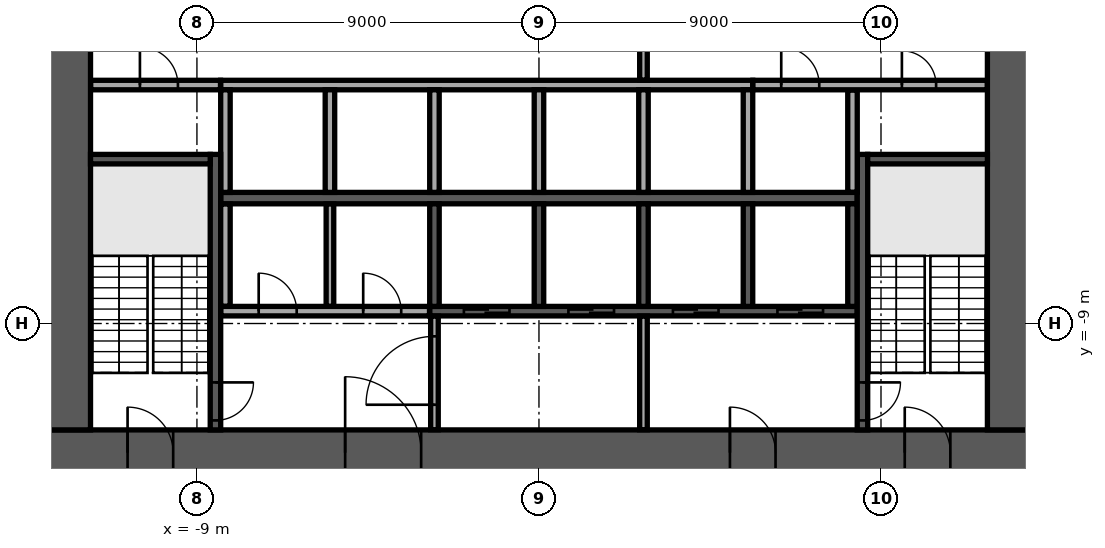
"""IFC4 building model, lengths in metres.
Left out: names, types, materials, properties, quantities, classifications, styles, units other than length and angle.
Written with IfcOpenShell. Run it as: python <this file> out.ifc"""

import sys

from ifc_helpers import new_model, si_unit, direction, frame, frame_2d, origin, place, context, subcontext, project, spatial, rectangle, extrude, element, fill, save


model = new_model("IFC4")
c1 = context("Model", 3, precision=1e-05, world=origin(), true_north=direction((0.0, 1.0)))
c2 = subcontext(c1, "Body", "Model", "MODEL_VIEW")
j1 = project(units=[si_unit("LENGTHUNIT", "METRE"), si_unit("PLANEANGLEUNIT", "RADIAN")], contexts=[c1])
p1 = place(None, origin())
s1 = spatial("IfcSite", under=j1, at=p1, CompositionType="ELEMENT")
p2 = place(p1, origin())
s2 = spatial("IfcBuilding", under=s1, at=p2, CompositionType="ELEMENT")
p3 = place(p2, frame((0.0, 0.0, 4.5)))
s3 = spatial("IfcBuildingStorey", under=s2, at=p3, CompositionType="ELEMENT", Elevation=4.5)
p4 = place(p3, frame((-13.0, -12.4, 0.0), z_axis=(0.0, 0.0, 1.0), x_axis=(1.0, 0.0, 0.0)))
e1 = element("IfcWall", 1, at=p4, inside=s3, PredefinedType="SHEAR", context=c2, shape_type="SweptSolid", body=[
    extrude(rectangle(XDim=26.0, YDim=1.2, at=frame_2d((13.0, 0.0))), origin(), (0.0, 0.0, 1.0), 4.1),
])
p5 = place(p4, frame((7.9, 0.0, 0.0)))
e2 = element("IfcOpeningElement", 2, at=p5, cuts=e1, PredefinedType="OPENING", context=c2, shape_type="SweptSolid", body=[
    extrude(rectangle(XDim=2.0, YDim=2.1, at=frame_2d((1.0, 1.05))), frame((0.0, 0.61, 0.0), z_axis=(0.0, -1.0, 0.0), x_axis=(1.0, 0.0, 0.0)), (0.0, 0.0, 1.0), 1.22),
])
p6 = place(p4, frame((18.025, 0.0, 0.0)))
e3 = element("IfcOpeningElement", 3, at=p6, cuts=e1, PredefinedType="OPENING", context=c2, shape_type="SweptSolid", body=[
    extrude(rectangle(XDim=1.2, YDim=2.1, at=frame_2d((0.6, 1.05))), frame((0.0, 0.61, 0.0), z_axis=(0.0, -1.0, 0.0), x_axis=(1.0, 0.0, 0.0)), (0.0, 0.0, 1.0), 1.22),
])
p7 = place(p4, frame((2.175, 0.0, 0.0)))
e4 = element("IfcOpeningElement", 4, at=p7, cuts=e1, PredefinedType="OPENING", context=c2, shape_type="SweptSolid", body=[
    extrude(rectangle(XDim=1.2, YDim=2.1, at=frame_2d((0.6, 1.05))), frame((0.0, 0.61, 0.0), z_axis=(0.0, -1.0, 0.0), x_axis=(1.0, 0.0, 0.0)), (0.0, 0.0, 1.0), 1.22),
])
p8 = place(p4, frame((22.625, 0.0, 0.0)))
e5 = element("IfcOpeningElement", 5, at=p8, cuts=e1, PredefinedType="OPENING", context=c2, shape_type="SweptSolid", body=[
    extrude(rectangle(XDim=1.2, YDim=2.1, at=frame_2d((0.6, 1.05))), frame((0.0, 0.61, 0.0), z_axis=(0.0, -1.0, 0.0), x_axis=(1.0, 0.0, 0.0)), (0.0, 0.0, 1.0), 1.22),
])
p9 = place(p3, frame((12.4, -11.8, 0.0), z_axis=(0.0, 0.0, 1.0), x_axis=(0.0, 1.0, 0.0)))
e6 = element("IfcWall", 6, at=p9, inside=s3, PredefinedType="SHEAR", context=c2, shape_type="SweptSolid", body=[
    extrude(rectangle(XDim=23.6, YDim=1.2, at=frame_2d((11.8, 0.0))), origin(), (0.0, 0.0, 1.0), 4.1),
])
p10 = place(p9, frame((10.6, 0.0, 0.0)))
e7 = element("IfcOpeningElement", 7, at=p10, cuts=e6, PredefinedType="OPENING", context=c2, shape_type="SweptSolid", body=[
    extrude(rectangle(XDim=2.4, YDim=2.4, at=frame_2d((1.2, 1.2))), frame((0.0, 0.61, 0.0), z_axis=(0.0, -1.0, 0.0), x_axis=(1.0, 0.0, 0.0)), (0.0, 0.0, 1.0), 1.22),
])
p11 = place(p3, frame((-12.4, -11.8, 0.0), z_axis=(0.0, 0.0, 1.0), x_axis=(0.0, 1.0, 0.0)))
e8 = element("IfcWall", 8, at=p11, inside=s3, PredefinedType="SHEAR", context=c2, shape_type="SweptSolid", body=[
    extrude(rectangle(XDim=23.6, YDim=1.2, at=frame_2d((11.8, 0.0))), origin(), (0.0, 0.0, 1.0), 4.1),
])
p12 = place(p11, frame((10.6, 0.0, 0.0)))
e9 = element("IfcOpeningElement", 9, at=p12, cuts=e8, PredefinedType="OPENING", context=c2, shape_type="SweptSolid", body=[
    extrude(rectangle(XDim=2.4, YDim=2.4, at=frame_2d((1.2, 1.2))), frame((0.0, 0.61, 0.0), z_axis=(0.0, -1.0, 0.0), x_axis=(1.0, 0.0, 0.0)), (0.0, 0.0, 1.0), 1.22),
])
p13 = place(p3, frame((-8.375, -5.7, 0.0), z_axis=(0.0, 0.0, 1.0), x_axis=(1.0, 0.0, 0.0)))
e10 = element("IfcWall", 10, at=p13, inside=s3, PredefinedType="SOLIDWALL", context=c2, shape_type="SweptSolid", body=[
    extrude(rectangle(XDim=16.75, YDim=0.3, at=frame_2d((8.375, 0.0))), origin(), (0.0, 0.0, 1.0), 4.1),
])
p14 = place(p3, frame((-8.375, -2.725, 0.0), z_axis=(0.0, 0.0, 1.0), x_axis=(1.0, 0.0, 0.0)))
e11 = element("IfcWall", 11, at=p14, inside=s3, PredefinedType="SOLIDWALL", context=c2, shape_type="SweptSolid", body=[
    extrude(rectangle(XDim=14.0, YDim=0.25, at=frame_2d((7.0, 0.0))), origin(), (0.0, 0.0, 1.0), 4.1),
])
for number, where, z_axis, x_axis in (
    (12, (-8.25, -5.55, 0.0), (0.0, 0.0, 1.0), (0.0, 1.0, 0.0)),
    (13, (-5.5, -5.55, 0.0), (0.0, 0.0, 1.0), (0.0, 1.0, 0.0)),
    (14, (-2.75, -5.55, 0.0), (0.0, 0.0, 1.0), (0.0, 1.0, 0.0)),
    (15, (0.0, -5.55, 0.0), (0.0, 0.0, 1.0), (0.0, 1.0, 0.0)),
    (16, (2.75, -5.55, 0.0), (0.0, 0.0, 1.0), (0.0, 1.0, 0.0)),
    (17, (5.5, -5.55, 0.0), (0.0, 0.0, 1.0), (0.0, 1.0, 0.0)),
):
    element("IfcWall", number, at=place(p3, frame(where, z_axis=z_axis, x_axis=x_axis)), inside=s3, PredefinedType="SOLIDWALL", context=c2, shape_type="SweptSolid", body=[
        extrude(rectangle(XDim=2.7, YDim=0.25, at=frame_2d((1.35, 0.0))), origin(), (0.0, 0.0, 1.0), 4.1),
    ])
p15 = place(p3, frame((-2.875, -8.675, 0.0), z_axis=(0.0, 0.0, 1.0), x_axis=(1.0, 0.0, 0.0)))
e18 = element("IfcWall", 18, at=p15, inside=s3, PredefinedType="SOLIDWALL", context=c2, shape_type="SweptSolid", body=[
    extrude(rectangle(XDim=11.25, YDim=0.25, at=frame_2d((5.625, 0.0))), origin(), (0.0, 0.0, 1.0), 4.1),
])
p16 = place(p15, frame((0.9, 0.0, 0.0)))
e19 = element("IfcOpeningElement", 19, at=p16, cuts=e18, PredefinedType="OPENING", context=c2, shape_type="SweptSolid", body=[
    extrude(rectangle(XDim=1.2, YDim=2.1, at=frame_2d((0.6, 1.05))), frame((0.0, 0.135, 0.0), z_axis=(0.0, -1.0, 0.0), x_axis=(1.0, 0.0, 0.0)), (0.0, 0.0, 1.0), 0.27),
])
p17 = place(p15, frame((3.65, 0.0, 0.0)))
e20 = element("IfcOpeningElement", 20, at=p17, cuts=e18, PredefinedType="OPENING", context=c2, shape_type="SweptSolid", body=[
    extrude(rectangle(XDim=1.2, YDim=2.1, at=frame_2d((0.6, 1.05))), frame((0.0, 0.135, 0.0), z_axis=(0.0, -1.0, 0.0), x_axis=(1.0, 0.0, 0.0)), (0.0, 0.0, 1.0), 0.27),
])
p18 = place(p15, frame((6.4, 0.0, 0.0)))
e21 = element("IfcOpeningElement", 21, at=p18, cuts=e18, PredefinedType="OPENING", context=c2, shape_type="SweptSolid", body=[
    extrude(rectangle(XDim=1.2, YDim=2.1, at=frame_2d((0.6, 1.05))), frame((0.0, 0.135, 0.0), z_axis=(0.0, -1.0, 0.0), x_axis=(1.0, 0.0, 0.0)), (0.0, 0.0, 1.0), 0.27),
])
p19 = place(p15, frame((9.15, 0.0, 0.0)))
e22 = element("IfcOpeningElement", 22, at=p19, cuts=e18, PredefinedType="OPENING", context=c2, shape_type="SweptSolid", body=[
    extrude(rectangle(XDim=1.2, YDim=2.1, at=frame_2d((0.6, 1.05))), frame((0.0, 0.135, 0.0), z_axis=(0.0, -1.0, 0.0), x_axis=(1.0, 0.0, 0.0)), (0.0, 0.0, 1.0), 0.27),
])
for number, where, z_axis, x_axis in (
    (23, (-2.75, -8.55, 0.0), (0.0, 0.0, 1.0), (0.0, 1.0, 0.0)),
    (24, (0.0, -8.55, 0.0), (0.0, 0.0, 1.0), (0.0, 1.0, 0.0)),
    (25, (2.75, -8.55, 0.0), (0.0, 0.0, 1.0), (0.0, 1.0, 0.0)),
    (26, (5.5, -8.55, 0.0), (0.0, 0.0, 1.0), (0.0, 1.0, 0.0)),
    (27, (8.25, -8.55, 0.0), (0.0, 0.0, 1.0), (0.0, 1.0, 0.0)),
):
    element("IfcWall", number, at=place(p3, frame(where, z_axis=z_axis, x_axis=x_axis)), inside=s3, PredefinedType="SOLIDWALL", context=c2, shape_type="SweptSolid", body=[
        extrude(rectangle(XDim=2.7, YDim=0.25, at=frame_2d((1.35, 0.0))), origin(), (0.0, 0.0, 1.0), 4.1),
    ])
p20 = place(p3, frame((-8.512, -4.55, 0.0), z_axis=(0.0, 0.0, 1.0), x_axis=(0.0, -1.0, 0.0)))
e28 = element("IfcWall", 28, at=p20, inside=s3, PredefinedType="SOLIDWALL", context=c2, shape_type="SweptSolid", body=[
    extrude(rectangle(XDim=7.25, YDim=0.275, at=frame_2d((3.625, 0.0))), origin(), (0.0, 0.0, 1.0), 4.1),
])
p21 = place(p20, frame((6.0, 0.0, 0.0)))
e29 = element("IfcOpeningElement", 29, at=p21, cuts=e28, PredefinedType="OPENING", context=c2, shape_type="SweptSolid", body=[
    extrude(rectangle(XDim=1.0, YDim=2.1, at=frame_2d((0.5, 1.05))), frame((0.0, 0.147, 0.0), z_axis=(0.0, -1.0, 0.0), x_axis=(1.0, 0.0, 0.0)), (0.0, 0.0, 1.0), 0.295),
])
p22 = place(p3, frame((-8.65, -4.675, 0.0), z_axis=(0.0, 0.0, 1.0), x_axis=(-1.0, 0.0, 0.0)))
e30 = element("IfcWall", 30, at=p22, inside=s3, PredefinedType="SOLIDWALL", context=c2, shape_type="SweptSolid", body=[
    extrude(rectangle(XDim=3.15, YDim=0.25, at=frame_2d((1.575, 0.0))), origin(), (0.0, 0.0, 1.0), 4.1),
])
p23 = place(p3, frame((8.512, -4.55, 0.0), z_axis=(0.0, 0.0, 1.0), x_axis=(0.0, -1.0, 0.0)))
e31 = element("IfcWall", 31, at=p23, inside=s3, PredefinedType="SOLIDWALL", context=c2, shape_type="SweptSolid", body=[
    extrude(rectangle(XDim=7.25, YDim=0.275, at=frame_2d((3.625, 0.0))), origin(), (0.0, 0.0, 1.0), 4.1),
])
p24 = place(p23, frame((6.0, 0.0, 0.0)))
e32 = element("IfcOpeningElement", 32, at=p24, cuts=e31, PredefinedType="OPENING", context=c2, shape_type="SweptSolid", body=[
    extrude(rectangle(XDim=1.0, YDim=2.1, at=frame_2d((0.5, 1.05))), frame((0.0, 0.147, 0.0), z_axis=(0.0, -1.0, 0.0), x_axis=(1.0, 0.0, 0.0)), (0.0, 0.0, 1.0), 0.295),
])
p25 = place(p3, frame((8.65, -4.675, 0.0), z_axis=(0.0, 0.0, 1.0), x_axis=(1.0, 0.0, 0.0)))
e33 = element("IfcWall", 33, at=p25, inside=s3, PredefinedType="SOLIDWALL", context=c2, shape_type="SweptSolid", body=[
    extrude(rectangle(XDim=3.15, YDim=0.25, at=frame_2d((1.575, 0.0))), origin(), (0.0, 0.0, 1.0), 4.1),
])
p26 = place(p3, frame((-2.75, -11.795, 0.0), z_axis=(0.0, 0.0, 1.0), x_axis=(0.0, 1.0, 0.0)))
e34 = element("IfcWall", 34, at=p26, inside=s3, PredefinedType="PARTITIONING", context=c2, shape_type="SweptSolid", body=[
    extrude(rectangle(XDim=2.99, YDim=0.2, at=frame_2d((1.495, 0.0))), origin(), (0.0, 0.0, 1.0), 4.1),
])
p27 = place(p26, frame((0.657, 0.0, 0.0)))
e35 = element("IfcOpeningElement", 35, at=p27, cuts=e34, PredefinedType="OPENING", context=c2, shape_type="SweptSolid", body=[
    extrude(rectangle(XDim=1.8, YDim=2.1, at=frame_2d((0.9, 1.05))), frame((0.0, 0.11, 0.0), z_axis=(0.0, -1.0, 0.0), x_axis=(1.0, 0.0, 0.0)), (0.0, 0.0, 1.0), 0.22),
])
p28 = place(p3, frame((2.75, -11.795, 0.0), z_axis=(0.0, 0.0, 1.0), x_axis=(0.0, 1.0, 0.0)))
e36 = element("IfcWall", 36, at=p28, inside=s3, PredefinedType="PARTITIONING", context=c2, shape_type="SweptSolid", body=[
    extrude(rectangle(XDim=2.99, YDim=0.2, at=frame_2d((1.495, 0.0))), origin(), (0.0, 0.0, 1.0), 4.1),
])
p29 = place(p3, frame((-8.37, -8.675, 0.0), z_axis=(0.0, 0.0, 1.0), x_axis=(1.0, 0.0, 0.0)))
e37 = element("IfcWall", 37, at=p29, inside=s3, PredefinedType="PARTITIONING", context=c2, shape_type="SweptSolid", body=[
    extrude(rectangle(XDim=5.49, YDim=0.25, at=frame_2d((2.745, 0.0))), origin(), (0.0, 0.0, 1.0), 4.1),
])
p30 = place(p29, frame((0.995, 0.0, 0.0)))
e38 = element("IfcOpeningElement", 38, at=p30, cuts=e37, PredefinedType="OPENING", context=c2, shape_type="SweptSolid", body=[
    extrude(rectangle(XDim=1.0, YDim=2.1, at=frame_2d((0.5, 1.05))), frame((0.0, 0.135, 0.0), z_axis=(0.0, -1.0, 0.0), x_axis=(1.0, 0.0, 0.0)), (0.0, 0.0, 1.0), 0.27),
])
p31 = place(p29, frame((3.745, 0.0, 0.0)))
e39 = element("IfcOpeningElement", 39, at=p31, cuts=e37, PredefinedType="OPENING", context=c2, shape_type="SweptSolid", body=[
    extrude(rectangle(XDim=1.0, YDim=2.1, at=frame_2d((0.5, 1.05))), frame((0.0, 0.135, 0.0), z_axis=(0.0, -1.0, 0.0), x_axis=(1.0, 0.0, 0.0)), (0.0, 0.0, 1.0), 0.27),
])
p32 = place(p3, frame((-8.25, -8.545, 0.0), z_axis=(0.0, 0.0, 1.0), x_axis=(0.0, 1.0, 0.0)))
e40 = element("IfcWall", 40, at=p32, inside=s3, PredefinedType="PARTITIONING", context=c2, shape_type="SweptSolid", body=[
    extrude(rectangle(XDim=2.69, YDim=0.25, at=frame_2d((1.345, 0.0))), origin(), (0.0, 0.0, 1.0), 4.1),
])
p33 = place(p3, frame((-5.5, -8.545, 0.0), z_axis=(0.0, 0.0, 1.0), x_axis=(0.0, 1.0, 0.0)))
e41 = element("IfcWall", 41, at=p33, inside=s3, PredefinedType="PARTITIONING", context=c2, shape_type="SweptSolid", body=[
    extrude(rectangle(XDim=2.69, YDim=0.2, at=frame_2d((1.345, 0.0))), origin(), (0.0, 0.0, 1.0), 4.1),
])
p34 = place(p3, frame((8.25, -5.545, 0.0), z_axis=(0.0, 0.0, 1.0), x_axis=(0.0, 1.0, 0.0)))
e42 = element("IfcWall", 42, at=p34, inside=s3, PredefinedType="PARTITIONING", context=c2, shape_type="SweptSolid", body=[
    extrude(rectangle(XDim=2.69, YDim=0.25, at=frame_2d((1.345, 0.0))), origin(), (0.0, 0.0, 1.0), 4.1),
])
p35 = place(p3, frame((-11.795, -2.725, 0.0), z_axis=(0.0, 0.0, 1.0), x_axis=(1.0, 0.0, 0.0)))
e43 = element("IfcWall", 43, at=p35, inside=s3, PredefinedType="PARTITIONING", context=c2, shape_type="SweptSolid", body=[
    extrude(rectangle(XDim=3.415, YDim=0.25, at=frame_2d((1.708, 0.0))), origin(), (0.0, 0.0, 1.0), 4.1),
])
p36 = place(p35, frame((1.295, 0.0, 0.0)))
e44 = element("IfcOpeningElement", 44, at=p36, cuts=e43, PredefinedType="OPENING", context=c2, shape_type="SweptSolid", body=[
    extrude(rectangle(XDim=1.0, YDim=2.1, at=frame_2d((0.5, 1.05))), frame((0.0, 0.135, 0.0), z_axis=(0.0, -1.0, 0.0), x_axis=(1.0, 0.0, 0.0)), (0.0, 0.0, 1.0), 0.27),
])
p37 = place(p3, frame((5.63, -2.725, 0.0), z_axis=(0.0, 0.0, 1.0), x_axis=(1.0, 0.0, 0.0)))
e45 = element("IfcWall", 45, at=p37, inside=s3, PredefinedType="PARTITIONING", context=c2, shape_type="SweptSolid", body=[
    extrude(rectangle(XDim=6.165, YDim=0.25, at=frame_2d((3.083, 0.0))), origin(), (0.0, 0.0, 1.0), 4.1),
])
p38 = place(p37, frame((0.745, 0.0, 0.0)))
e46 = element("IfcOpeningElement", 46, at=p38, cuts=e45, PredefinedType="OPENING", context=c2, shape_type="SweptSolid", body=[
    extrude(rectangle(XDim=1.0, YDim=2.1, at=frame_2d((0.5, 1.05))), frame((0.0, 0.135, 0.0), z_axis=(0.0, -1.0, 0.0), x_axis=(1.0, 0.0, 0.0)), (0.0, 0.0, 1.0), 0.27),
])
p39 = place(p37, frame((3.92, 0.0, 0.0)))
e47 = element("IfcOpeningElement", 47, at=p39, cuts=e45, PredefinedType="OPENING", context=c2, shape_type="SweptSolid", body=[
    extrude(rectangle(XDim=0.9, YDim=2.1, at=frame_2d((0.45, 1.05))), frame((0.0, 0.135, 0.0), z_axis=(0.0, -1.0, 0.0), x_axis=(1.0, 0.0, 0.0)), (0.0, 0.0, 1.0), 0.27),
])
p40 = place(p3, frame((2.75, -2.595, 0.0), z_axis=(0.0, 0.0, 1.0), x_axis=(0.0, 1.0, 0.0)))
e48 = element("IfcWall", 48, at=p40, inside=s3, PredefinedType="PARTITIONING", context=c2, shape_type="SweptSolid", body=[
    extrude(rectangle(XDim=5.19, YDim=0.2, at=frame_2d((2.595, 0.0))), origin(), (0.0, 0.0, 1.0), 4.1),
])
p41 = place(p40, frame((1.395, 0.0, 0.0)))
e49 = element("IfcOpeningElement", 49, at=p41, cuts=e48, PredefinedType="OPENING", context=c2, shape_type="SweptSolid", body=[
    extrude(rectangle(XDim=2.4, YDim=2.4, at=frame_2d((1.2, 1.2))), frame((0.0, 0.11, 0.0), z_axis=(0.0, -1.0, 0.0), x_axis=(1.0, 0.0, 0.0)), (0.0, 0.0, 1.0), 0.22),
])
p42 = place(p5, origin())
e50 = element("IfcDoor", 50, at=p42, inside=s3, OperationType="SINGLE_SWING_LEFT", PredefinedType="DOOR", context=c2, shape_type="SweptSolid", body=[
    extrude(rectangle(XDim=2.0, YDim=2.1, at=frame_2d((1.0, 1.05))), frame((0.0, 0.025, 0.0), z_axis=(0.0, -1.0, 0.0), x_axis=(1.0, 0.0, 0.0)), (0.0, 0.0, 1.0), 0.05),
])
fill(e2, e50)
p43 = place(p6, origin())
e51 = element("IfcDoor", 51, at=p43, inside=s3, OperationType="SINGLE_SWING_LEFT", PredefinedType="DOOR", context=c2, shape_type="SweptSolid", body=[
    extrude(rectangle(XDim=1.2, YDim=2.1, at=frame_2d((0.6, 1.05))), frame((0.0, 0.025, 0.0), z_axis=(0.0, -1.0, 0.0), x_axis=(1.0, 0.0, 0.0)), (0.0, 0.0, 1.0), 0.05),
])
fill(e3, e51)
p44 = place(p7, origin())
e52 = element("IfcDoor", 52, at=p44, inside=s3, OperationType="SINGLE_SWING_LEFT", PredefinedType="DOOR", context=c2, shape_type="SweptSolid", body=[
    extrude(rectangle(XDim=1.2, YDim=2.1, at=frame_2d((0.6, 1.05))), frame((0.0, 0.025, 0.0), z_axis=(0.0, -1.0, 0.0), x_axis=(1.0, 0.0, 0.0)), (0.0, 0.0, 1.0), 0.05),
])
fill(e4, e52)
p45 = place(p8, origin())
e53 = element("IfcDoor", 53, at=p45, inside=s3, OperationType="SINGLE_SWING_LEFT", PredefinedType="DOOR", context=c2, shape_type="SweptSolid", body=[
    extrude(rectangle(XDim=1.2, YDim=2.1, at=frame_2d((0.6, 1.05))), frame((0.0, 0.025, 0.0), z_axis=(0.0, -1.0, 0.0), x_axis=(1.0, 0.0, 0.0)), (0.0, 0.0, 1.0), 0.05),
])
fill(e5, e53)
p46 = place(p16, origin())
e54 = element("IfcDoor", 54, at=p46, inside=s3, OperationType="DOUBLE_DOOR_SLIDING", PredefinedType="DOOR", context=c2, shape_type="SweptSolid", body=[
    extrude(rectangle(XDim=1.2, YDim=2.1, at=frame_2d((0.6, 1.05))), frame((0.0, 0.025, 0.0), z_axis=(0.0, -1.0, 0.0), x_axis=(1.0, 0.0, 0.0)), (0.0, 0.0, 1.0), 0.05),
])
fill(e19, e54)
p47 = place(p17, origin())
e55 = element("IfcDoor", 55, at=p47, inside=s3, OperationType="DOUBLE_DOOR_SLIDING", PredefinedType="DOOR", context=c2, shape_type="SweptSolid", body=[
    extrude(rectangle(XDim=1.2, YDim=2.1, at=frame_2d((0.6, 1.05))), frame((0.0, 0.025, 0.0), z_axis=(0.0, -1.0, 0.0), x_axis=(1.0, 0.0, 0.0)), (0.0, 0.0, 1.0), 0.05),
])
fill(e20, e55)
p48 = place(p18, origin())
e56 = element("IfcDoor", 56, at=p48, inside=s3, OperationType="DOUBLE_DOOR_SLIDING", PredefinedType="DOOR", context=c2, shape_type="SweptSolid", body=[
    extrude(rectangle(XDim=1.2, YDim=2.1, at=frame_2d((0.6, 1.05))), frame((0.0, 0.025, 0.0), z_axis=(0.0, -1.0, 0.0), x_axis=(1.0, 0.0, 0.0)), (0.0, 0.0, 1.0), 0.05),
])
fill(e21, e56)
p49 = place(p19, origin())
e57 = element("IfcDoor", 57, at=p49, inside=s3, OperationType="DOUBLE_DOOR_SLIDING", PredefinedType="DOOR", context=c2, shape_type="SweptSolid", body=[
    extrude(rectangle(XDim=1.2, YDim=2.1, at=frame_2d((0.6, 1.05))), frame((0.0, 0.025, 0.0), z_axis=(0.0, -1.0, 0.0), x_axis=(1.0, 0.0, 0.0)), (0.0, 0.0, 1.0), 0.05),
])
fill(e22, e57)
p50 = place(p21, origin())
e58 = element("IfcDoor", 58, at=p50, inside=s3, OperationType="SINGLE_SWING_LEFT", PredefinedType="DOOR", context=c2, shape_type="SweptSolid", body=[
    extrude(rectangle(XDim=1.0, YDim=2.1, at=frame_2d((0.5, 1.05))), frame((0.0, 0.025, 0.0), z_axis=(0.0, -1.0, 0.0), x_axis=(1.0, 0.0, 0.0)), (0.0, 0.0, 1.0), 0.05),
])
fill(e29, e58)
p51 = place(p24, origin())
e59 = element("IfcDoor", 59, at=p51, inside=s3, OperationType="SINGLE_SWING_LEFT", PredefinedType="DOOR", context=c2, shape_type="SweptSolid", body=[
    extrude(rectangle(XDim=1.0, YDim=2.1, at=frame_2d((0.5, 1.05))), frame((0.0, 0.025, 0.0), z_axis=(0.0, -1.0, 0.0), x_axis=(1.0, 0.0, 0.0)), (0.0, 0.0, 1.0), 0.05),
])
fill(e32, e59)
p52 = place(p30, origin())
e60 = element("IfcDoor", 60, at=p52, inside=s3, OperationType="SINGLE_SWING_RIGHT", PredefinedType="DOOR", context=c2, shape_type="SweptSolid", body=[
    extrude(rectangle(XDim=1.0, YDim=2.1, at=frame_2d((0.5, 1.05))), frame((0.0, 0.025, 0.0), z_axis=(0.0, -1.0, 0.0), x_axis=(1.0, 0.0, 0.0)), (0.0, 0.0, 1.0), 0.05),
])
fill(e38, e60)
p53 = place(p31, origin())
e61 = element("IfcDoor", 61, at=p53, inside=s3, OperationType="SINGLE_SWING_RIGHT", PredefinedType="DOOR", context=c2, shape_type="SweptSolid", body=[
    extrude(rectangle(XDim=1.0, YDim=2.1, at=frame_2d((0.5, 1.05))), frame((0.0, 0.025, 0.0), z_axis=(0.0, -1.0, 0.0), x_axis=(1.0, 0.0, 0.0)), (0.0, 0.0, 1.0), 0.05),
])
fill(e39, e61)
p54 = place(p36, origin())
e62 = element("IfcDoor", 62, at=p54, inside=s3, OperationType="SINGLE_SWING_RIGHT", PredefinedType="DOOR", context=c2, shape_type="SweptSolid", body=[
    extrude(rectangle(XDim=1.0, YDim=2.1, at=frame_2d((0.5, 1.05))), frame((0.0, 0.025, 0.0), z_axis=(0.0, -1.0, 0.0), x_axis=(1.0, 0.0, 0.0)), (0.0, 0.0, 1.0), 0.05),
])
fill(e44, e62)
p55 = place(p38, origin())
e63 = element("IfcDoor", 63, at=p55, inside=s3, OperationType="SINGLE_SWING_RIGHT", PredefinedType="DOOR", context=c2, shape_type="SweptSolid", body=[
    extrude(rectangle(XDim=1.0, YDim=2.1, at=frame_2d((0.5, 1.05))), frame((0.0, 0.025, 0.0), z_axis=(0.0, -1.0, 0.0), x_axis=(1.0, 0.0, 0.0)), (0.0, 0.0, 1.0), 0.05),
])
fill(e46, e63)
p56 = place(p39, origin())
e64 = element("IfcDoor", 64, at=p56, inside=s3, OperationType="SINGLE_SWING_RIGHT", PredefinedType="DOOR", context=c2, shape_type="SweptSolid", body=[
    extrude(rectangle(XDim=0.9, YDim=2.1, at=frame_2d((0.45, 1.05))), frame((0.0, 0.025, 0.0), z_axis=(0.0, -1.0, 0.0), x_axis=(1.0, 0.0, 0.0)), (0.0, 0.0, 1.0), 0.05),
])
fill(e47, e64)
p57 = place(p27, origin())
e65 = element("IfcDoor", 65, at=p57, inside=s3, OperationType="SINGLE_SWING_LEFT", PredefinedType="DOOR", context=c2, shape_type="SweptSolid", body=[
    extrude(rectangle(XDim=1.8, YDim=2.1, at=frame_2d((0.9, 1.05))), frame((0.0, 0.025, 0.0), z_axis=(0.0, -1.0, 0.0), x_axis=(1.0, 0.0, 0.0)), (0.0, 0.0, 1.0), 0.05),
])
fill(e35, e65)
save(model, sys.argv[1])
